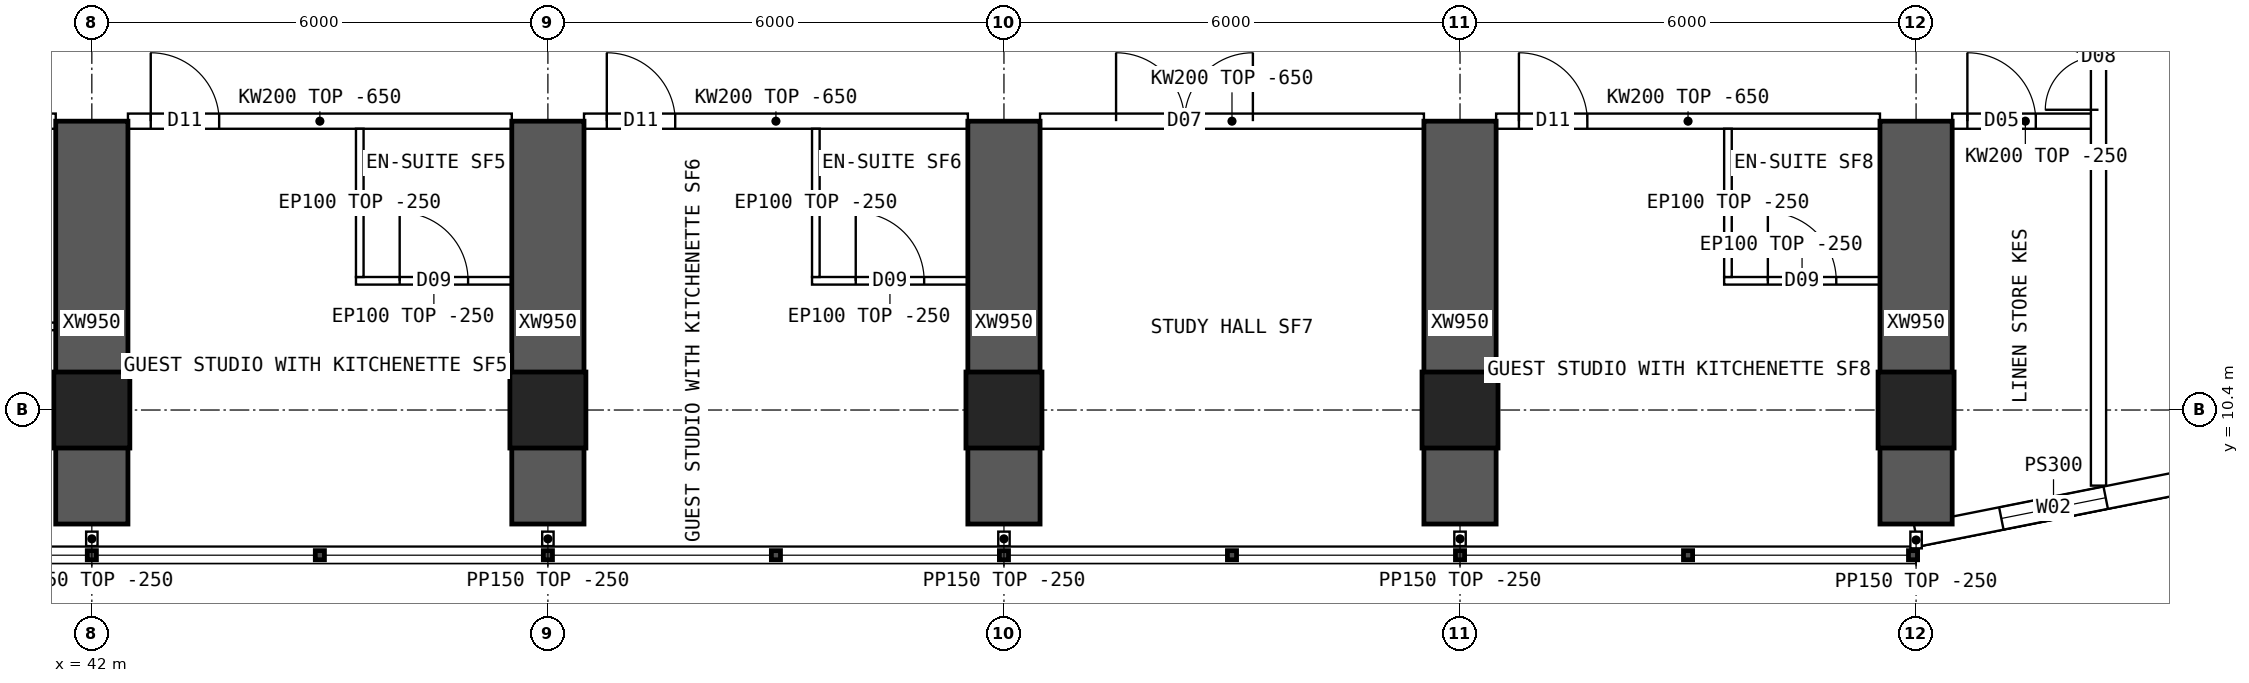
"""IFC4 building model, lengths in metres.
Left out: names, types, materials, properties, quantities, classifications, styles, units other than length and angle.
Written with IfcOpenShell. Run it as: python <this file> out.ifc"""

import sys

from ifc_helpers import new_model, si_unit, direction, frame, frame_2d, origin, origin_2d, place, context, subcontext, project, spatial, polyline, rectangle, hollow_rectangle, outline, extrude, element, fill, save


model = new_model("IFC4")
c1 = context("Model", 3, precision=1e-05, world=origin(), true_north=direction((0.0, 1.0)))
c2 = subcontext(c1, "Body", "Model", "MODEL_VIEW")
j1 = project(units=[si_unit("LENGTHUNIT", "METRE"), si_unit("PLANEANGLEUNIT", "RADIAN")], contexts=[c1])
p1 = place(None, origin())
s1 = spatial("IfcSite", under=j1, at=p1, CompositionType="ELEMENT")
p2 = place(p1, origin())
s2 = spatial("IfcBuilding", under=s1, at=p2, CompositionType="ELEMENT")
p3 = place(p2, frame((0.0, 0.0, 76.15)))
s3 = spatial("IfcBuildingStorey", under=s2, at=p3, CompositionType="ELEMENT", Elevation=76.15)
for number, where, z_axis, x_axis in (
    (1, (42.0, 10.4, 0.0), (0.0, 0.0, 1.0), (1.0, 0.0, 0.0)),
    (2, (48.0, 10.4, 0.0), (0.0, 0.0, 1.0), (1.0, 0.0, 0.0)),
    (3, (54.0, 10.4, 0.0), (0.0, 0.0, 1.0), (1.0, 0.0, 0.0)),
    (4, (60.0, 10.4, 0.0), (0.0, 0.0, 1.0), (1.0, 0.0, 0.0)),
    (5, (66.0, 10.4, 0.0), (0.0, 0.0, 1.0), (1.0, 0.0, 0.0)),
):
    element("IfcColumn", number, at=place(p3, frame(where, z_axis=z_axis, x_axis=x_axis)), inside=s3, PredefinedType="COLUMN", context=c2, shape_type="SweptSolid", body=[
        extrude(hollow_rectangle(XDim=1.0, YDim=1.0, WallThickness=0.1, at=origin_2d()), origin(), (0.0, 0.0, 1.0), 4.5),
    ])
for number, where, z_axis, x_axis in (
    (6, (42.0, 8.9, 0.0), (0.0, 0.0, 1.0), (0.0, 1.0, 0.0)),
    (7, (48.0, 8.9, 0.0), (0.0, 0.0, 1.0), (0.0, 1.0, 0.0)),
    (8, (54.0, 8.9, 0.0), (0.0, 0.0, 1.0), (0.0, 1.0, 0.0)),
    (9, (60.0, 8.9, 0.0), (0.0, 0.0, 1.0), (0.0, 1.0, 0.0)),
    (10, (66.0, 8.9, 0.0), (0.0, 0.0, 1.0), (0.0, 1.0, 0.0)),
):
    element("IfcWall", number, at=place(p3, frame(where, z_axis=z_axis, x_axis=x_axis)), inside=s3, PredefinedType="SHEAR", context=c2, shape_type="SweptSolid", body=[
        extrude(rectangle(XDim=5.3, YDim=0.95, at=frame_2d((2.65, 0.0))), origin(), (0.0, 0.0, 1.0), 4.5),
    ])
p4 = place(p3, frame((66.0, 8.75, 0.0), z_axis=(0.0, 0.0, 1.0), x_axis=(0.980791473772, 0.195059183267, 0.0)))
e11 = element("IfcWall", 11, at=p4, inside=s3, PredefinedType="SOLIDWALL", context=c2, shape_type="SweptSolid", body=[
    extrude(outline(polyline([(-0.03, -0.15), (3.717, -0.15), (3.657, 0.15), (0.03, 0.15), (-0.03, -0.15)])), origin(), (0.0, 0.0, 1.0), 4.25),
])
p5 = place(p4, frame((1.144, 0.0, 0.9)))
e12 = element("IfcOpeningElement", 12, at=p5, cuts=e11, PredefinedType="OPENING", context=c2, shape_type="SweptSolid", body=[
    extrude(rectangle(XDim=1.4, YDim=1.8, at=frame_2d((0.7, 0.9))), frame((0.0, 0.16, 0.0), z_axis=(0.0, -1.0, 0.0), x_axis=(1.0, 0.0, 0.0)), (0.0, 0.0, 1.0), 0.32),
])
p6 = place(p3, frame((36.475, 14.2, 0.0), z_axis=(0.0, 0.0, 1.0), x_axis=(1.0, 0.0, 0.0)))
e13 = element("IfcWall", 13, at=p6, inside=s3, PredefinedType="SOLIDWALL", context=c2, shape_type="SweptSolid", body=[
    extrude(outline(polyline([(0.0, 0.0), (5.05, 0.0), (5.05, 3.85), (0.0, 3.85), (0.0, 0.0)])), frame((0.0, 0.1, 0.0), z_axis=(0.0, -1.0, 0.0), x_axis=(1.0, 0.0, 0.0)), (0.0, 0.0, 1.0), 0.2),
])
p7 = place(p6, frame((0.3, 0.0, 0.0)))
e14 = element("IfcOpeningElement", 14, at=p7, cuts=e13, PredefinedType="OPENING", context=c2, shape_type="SweptSolid", body=[
    extrude(rectangle(XDim=1.0, YDim=2.1, at=frame_2d((0.5, 1.05))), frame((0.0, 0.11, 0.0), z_axis=(0.0, -1.0, 0.0), x_axis=(1.0, 0.0, 0.0)), (0.0, 0.0, 1.0), 0.22),
])
p8 = place(p3, frame((42.475, 14.2, 0.0), z_axis=(0.0, 0.0, 1.0), x_axis=(1.0, 0.0, 0.0)))
e15 = element("IfcWall", 15, at=p8, inside=s3, PredefinedType="SOLIDWALL", context=c2, shape_type="SweptSolid", body=[
    extrude(outline(polyline([(0.0, 0.0), (5.05, 0.0), (5.05, 3.85), (0.0, 3.85), (0.0, 0.0)])), frame((0.0, 0.1, 0.0), z_axis=(0.0, -1.0, 0.0), x_axis=(1.0, 0.0, 0.0)), (0.0, 0.0, 1.0), 0.2),
])
p9 = place(p8, frame((0.3, 0.0, 0.0)))
e16 = element("IfcOpeningElement", 16, at=p9, cuts=e15, PredefinedType="OPENING", context=c2, shape_type="SweptSolid", body=[
    extrude(rectangle(XDim=0.9, YDim=2.1, at=frame_2d((0.45, 1.05))), frame((0.0, 0.11, 0.0), z_axis=(0.0, -1.0, 0.0), x_axis=(1.0, 0.0, 0.0)), (0.0, 0.0, 1.0), 0.22),
])
p10 = place(p3, frame((48.475, 14.2, 0.0), z_axis=(0.0, 0.0, 1.0), x_axis=(1.0, 0.0, 0.0)))
e17 = element("IfcWall", 17, at=p10, inside=s3, PredefinedType="SOLIDWALL", context=c2, shape_type="SweptSolid", body=[
    extrude(outline(polyline([(0.0, 0.0), (5.05, 0.0), (5.05, 3.85), (0.0, 3.85), (0.0, 0.0)])), frame((0.0, 0.1, 0.0), z_axis=(0.0, -1.0, 0.0), x_axis=(1.0, 0.0, 0.0)), (0.0, 0.0, 1.0), 0.2),
])
p11 = place(p10, frame((0.3, 0.0, 0.0)))
e18 = element("IfcOpeningElement", 18, at=p11, cuts=e17, PredefinedType="OPENING", context=c2, shape_type="SweptSolid", body=[
    extrude(rectangle(XDim=0.9, YDim=2.1, at=frame_2d((0.45, 1.05))), frame((0.0, 0.11, 0.0), z_axis=(0.0, -1.0, 0.0), x_axis=(1.0, 0.0, 0.0)), (0.0, 0.0, 1.0), 0.22),
])
p12 = place(p3, frame((54.475, 14.2, 0.0), z_axis=(0.0, 0.0, 1.0), x_axis=(1.0, 0.0, 0.0)))
e19 = element("IfcWall", 19, at=p12, inside=s3, PredefinedType="SOLIDWALL", context=c2, shape_type="SweptSolid", body=[
    extrude(outline(polyline([(0.0, 0.0), (5.05, 0.0), (5.05, 3.85), (0.0, 3.85), (0.0, 0.0)])), frame((0.0, 0.1, 0.0), z_axis=(0.0, -1.0, 0.0), x_axis=(1.0, 0.0, 0.0)), (0.0, 0.0, 1.0), 0.2),
])
p13 = place(p12, frame((1.0, 0.0, 0.0)))
e20 = element("IfcOpeningElement", 20, at=p13, cuts=e19, PredefinedType="OPENING", context=c2, shape_type="SweptSolid", body=[
    extrude(rectangle(XDim=1.8, YDim=2.1, at=frame_2d((0.9, 1.05))), frame((0.0, 0.11, 0.0), z_axis=(0.0, -1.0, 0.0), x_axis=(1.0, 0.0, 0.0)), (0.0, 0.0, 1.0), 0.22),
])
p14 = place(p3, frame((60.475, 14.2, 0.0), z_axis=(0.0, 0.0, 1.0), x_axis=(1.0, 0.0, 0.0)))
e21 = element("IfcWall", 21, at=p14, inside=s3, PredefinedType="SOLIDWALL", context=c2, shape_type="SweptSolid", body=[
    extrude(outline(polyline([(0.0, 0.0), (5.05, 0.0), (5.05, 3.85), (0.0, 3.85), (0.0, 0.0)])), frame((0.0, 0.1, 0.0), z_axis=(0.0, -1.0, 0.0), x_axis=(1.0, 0.0, 0.0)), (0.0, 0.0, 1.0), 0.2),
])
p15 = place(p14, frame((0.3, 0.0, 0.0)))
e22 = element("IfcOpeningElement", 22, at=p15, cuts=e21, PredefinedType="OPENING", context=c2, shape_type="SweptSolid", body=[
    extrude(rectangle(XDim=0.9, YDim=2.1, at=frame_2d((0.45, 1.05))), frame((0.0, 0.11, 0.0), z_axis=(0.0, -1.0, 0.0), x_axis=(1.0, 0.0, 0.0)), (0.0, 0.0, 1.0), 0.22),
])
p16 = place(p3, frame((66.475, 14.2, 0.0), z_axis=(0.0, 0.0, 1.0), x_axis=(1.0, 0.0, 0.0)))
e23 = element("IfcWall", 23, at=p16, inside=s3, PredefinedType="SOLIDWALL", context=c2, shape_type="SweptSolid", body=[
    extrude(rectangle(XDim=1.925, YDim=0.2, at=frame_2d((0.962, 0.0))), origin(), (0.0, 0.0, 1.0), 4.25),
])
p17 = place(p16, frame((0.2, 0.0, 0.0)))
e24 = element("IfcOpeningElement", 24, at=p17, cuts=e23, PredefinedType="OPENING", context=c2, shape_type="SweptSolid", body=[
    extrude(rectangle(XDim=0.9, YDim=2.1, at=frame_2d((0.45, 1.05))), frame((0.0, 0.11, 0.0), z_axis=(0.0, -1.0, 0.0), x_axis=(1.0, 0.0, 0.0)), (0.0, 0.0, 1.0), 0.22),
])
p18 = place(p3, frame((38.875, 11.5, 0.0), z_axis=(0.0, 0.0, 1.0), x_axis=(1.0, 0.0, 0.0)))
e25 = element("IfcWall", 25, at=p18, inside=s3, PredefinedType="PARTITIONING", context=c2, shape_type="SweptSolid", body=[
    extrude(rectangle(XDim=2.65, YDim=0.1, at=frame_2d((1.325, 0.0))), origin(), (0.0, 0.0, 1.0), 4.25),
])
p19 = place(p3, frame((47.525, 12.1, 0.0), z_axis=(0.0, 0.0, 1.0), x_axis=(-1.0, 0.0, 0.0)))
e26 = element("IfcWall", 26, at=p19, inside=s3, PredefinedType="PARTITIONING", context=c2, shape_type="SweptSolid", body=[
    extrude(rectangle(XDim=2.05, YDim=0.1, at=frame_2d((1.025, 0.0))), origin(), (0.0, 0.0, 1.0), 4.25),
])
p20 = place(p19, frame((0.575, 0.0, 0.0)))
e27 = element("IfcOpeningElement", 27, at=p20, cuts=e26, PredefinedType="OPENING", context=c2, shape_type="SweptSolid", body=[
    extrude(rectangle(XDim=0.9, YDim=2.1, at=frame_2d((0.45, 1.05))), frame((0.0, 0.06, 0.0), z_axis=(0.0, -1.0, 0.0), x_axis=(1.0, 0.0, 0.0)), (0.0, 0.0, 1.0), 0.12),
])
p21 = place(p3, frame((45.525, 12.15, 0.0), z_axis=(0.0, 0.0, 1.0), x_axis=(0.0, 1.0, 0.0)))
e28 = element("IfcWall", 28, at=p21, inside=s3, PredefinedType="PARTITIONING", context=c2, shape_type="SweptSolid", body=[
    extrude(outline(polyline([(0.0, 0.0), (1.95, 0.0), (1.95, 3.85), (1.902, 3.85), (1.9, 4.25), (0.0, 4.25), (0.0, 0.0)])), frame((0.0, 0.05, 0.0), z_axis=(0.0, -1.0, 0.0), x_axis=(1.0, 0.0, 0.0)), (0.0, 0.0, 1.0), 0.1),
])
p22 = place(p3, frame((53.525, 12.1, 0.0), z_axis=(0.0, 0.0, 1.0), x_axis=(-1.0, 0.0, 0.0)))
e29 = element("IfcWall", 29, at=p22, inside=s3, PredefinedType="PARTITIONING", context=c2, shape_type="SweptSolid", body=[
    extrude(rectangle(XDim=2.05, YDim=0.1, at=frame_2d((1.025, 0.0))), origin(), (0.0, 0.0, 1.0), 4.25),
])
p23 = place(p22, frame((0.575, 0.0, 0.0)))
e30 = element("IfcOpeningElement", 30, at=p23, cuts=e29, PredefinedType="OPENING", context=c2, shape_type="SweptSolid", body=[
    extrude(rectangle(XDim=0.9, YDim=2.1, at=frame_2d((0.45, 1.05))), frame((0.0, 0.06, 0.0), z_axis=(0.0, -1.0, 0.0), x_axis=(1.0, 0.0, 0.0)), (0.0, 0.0, 1.0), 0.12),
])
p24 = place(p3, frame((51.525, 12.15, 0.0), z_axis=(0.0, 0.0, 1.0), x_axis=(0.0, 1.0, 0.0)))
e31 = element("IfcWall", 31, at=p24, inside=s3, PredefinedType="PARTITIONING", context=c2, shape_type="SweptSolid", body=[
    extrude(outline(polyline([(0.0, 0.0), (1.95, 0.0), (1.95, 3.85), (1.902, 3.85), (1.9, 4.25), (0.0, 4.25), (0.0, 0.0)])), frame((0.0, 0.05, 0.0), z_axis=(0.0, -1.0, 0.0), x_axis=(1.0, 0.0, 0.0)), (0.0, 0.0, 1.0), 0.1),
])
p25 = place(p3, frame((65.525, 12.1, 0.0), z_axis=(0.0, 0.0, 1.0), x_axis=(-1.0, 0.0, 0.0)))
e32 = element("IfcWall", 32, at=p25, inside=s3, PredefinedType="PARTITIONING", context=c2, shape_type="SweptSolid", body=[
    extrude(rectangle(XDim=2.05, YDim=0.1, at=frame_2d((1.025, 0.0))), origin(), (0.0, 0.0, 1.0), 4.25),
])
p26 = place(p25, frame((0.575, 0.0, 0.0)))
e33 = element("IfcOpeningElement", 33, at=p26, cuts=e32, PredefinedType="OPENING", context=c2, shape_type="SweptSolid", body=[
    extrude(rectangle(XDim=0.9, YDim=2.1, at=frame_2d((0.45, 1.05))), frame((0.0, 0.06, 0.0), z_axis=(0.0, -1.0, 0.0), x_axis=(1.0, 0.0, 0.0)), (0.0, 0.0, 1.0), 0.12),
])
p27 = place(p3, frame((63.525, 12.15, 0.0), z_axis=(0.0, 0.0, 1.0), x_axis=(0.0, 1.0, 0.0)))
e34 = element("IfcWall", 34, at=p27, inside=s3, PredefinedType="PARTITIONING", context=c2, shape_type="SweptSolid", body=[
    extrude(outline(polyline([(0.0, 0.0), (1.95, 0.0), (1.95, 3.85), (1.902, 3.85), (1.9, 4.25), (0.0, 4.25), (0.0, 0.0)])), frame((0.0, 0.05, 0.0), z_axis=(0.0, -1.0, 0.0), x_axis=(1.0, 0.0, 0.0)), (0.0, 0.0, 1.0), 0.1),
])
p28 = place(p3, frame((68.4, 9.405, 0.0), z_axis=(0.0, 0.0, 1.0), x_axis=(0.0, 1.0, 0.0)))
e35 = element("IfcWall", 35, at=p28, inside=s3, PredefinedType="SOLIDWALL", context=c2, shape_type="SweptSolid", body=[
    extrude(rectangle(XDim=45.189, YDim=0.2, at=frame_2d((22.595, 0.0))), origin(), (0.0, 0.0, 1.0), 4.25),
])
p29 = place(p28, frame((13.795, 0.0, 0.0)))
e36 = element("IfcOpeningElement", 36, at=p29, cuts=e35, PredefinedType="OPENING", context=c2, shape_type="SweptSolid", body=[
    extrude(rectangle(XDim=1.2, YDim=2.1, at=frame_2d((0.6, 1.05))), frame((0.0, 0.11, 0.0), z_axis=(0.0, -1.0, 0.0), x_axis=(1.0, 0.0, 0.0)), (0.0, 0.0, 1.0), 0.22),
])
p30 = place(p28, frame((25.595, 0.0, 0.0)))
e37 = element("IfcOpeningElement", 37, at=p30, cuts=e35, PredefinedType="OPENING", context=c2, shape_type="SweptSolid", body=[
    extrude(rectangle(XDim=1.2, YDim=2.1, at=frame_2d((0.6, 1.05))), frame((0.0, 0.11, 0.0), z_axis=(0.0, -1.0, 0.0), x_axis=(1.0, 0.0, 0.0)), (0.0, 0.0, 1.0), 0.22),
])
p31 = place(p28, frame((4.945, 0.0, 0.0)))
e38 = element("IfcOpeningElement", 38, at=p31, cuts=e35, PredefinedType="OPENING", context=c2, shape_type="SweptSolid", body=[
    extrude(rectangle(XDim=1.4, YDim=2.1, at=frame_2d((0.7, 1.05))), frame((0.0, 0.11, 0.0), z_axis=(0.0, -1.0, 0.0), x_axis=(1.0, 0.0, 0.0)), (0.0, 0.0, 1.0), 0.22),
])
p32 = place(p28, frame((38.745, 0.0, 0.0)))
e39 = element("IfcOpeningElement", 39, at=p32, cuts=e35, PredefinedType="OPENING", context=c2, shape_type="SweptSolid", body=[
    extrude(rectangle(XDim=1.4, YDim=2.1, at=frame_2d((0.7, 1.05))), frame((0.0, 0.11, 0.0), z_axis=(0.0, -1.0, 0.0), x_axis=(1.0, 0.0, 0.0)), (0.0, 0.0, 1.0), 0.22),
])
for number, where, z_axis, x_axis in (
    (40, (42.0, 8.8, 0.0), (0.0, 0.0, 1.0), (0.0, -1.0, 0.0)),
    (41, (48.0, 8.8, 0.0), (0.0, 0.0, 1.0), (0.0, -1.0, 0.0)),
    (42, (54.0, 8.8, 0.0), (0.0, 0.0, 1.0), (0.0, -1.0, 0.0)),
    (43, (60.0, 8.8, 0.0), (0.0, 0.0, 1.0), (0.0, -1.0, 0.0)),
):
    element("IfcWall", number, at=place(p3, frame(where, z_axis=z_axis, x_axis=x_axis)), inside=s3, PredefinedType="PARTITIONING", context=c2, shape_type="SweptSolid", body=[
        extrude(rectangle(XDim=0.19, YDim=0.15, at=frame_2d((0.095, 0.0))), origin(), (0.0, 0.0, 1.0), 4.25),
    ])
p33 = place(p3, frame((66.0, 8.8, 0.0), z_axis=(0.0, 0.0, 1.0), x_axis=(0.0, -1.0, 0.0)))
e44 = element("IfcWall", 44, at=p33, inside=s3, PredefinedType="PARTITIONING", context=c2, shape_type="SweptSolid", body=[
    extrude(rectangle(XDim=0.22, YDim=0.15, at=frame_2d((0.11, 0.0))), origin(), (0.0, 0.0, 1.0), 4.25),
])
p34 = place(p5, origin())
e45 = element("IfcWindow", 45, at=p34, inside=s3, PartitioningType="SINGLE_PANEL", PredefinedType="WINDOW", context=c2, shape_type="SweptSolid", body=[
    extrude(rectangle(XDim=1.4, YDim=1.8, at=frame_2d((0.7, 0.9))), frame((0.0, 0.03, 0.0), z_axis=(0.0, -1.0, 0.0), x_axis=(1.0, 0.0, 0.0)), (0.0, 0.0, 1.0), 0.06),
])
fill(e12, e45)
p35 = place(p20, origin())
e46 = element("IfcDoor", 46, at=p35, inside=s3, OperationType="SINGLE_SWING_RIGHT", PredefinedType="DOOR", context=c2, shape_type="SweptSolid", body=[
    extrude(rectangle(XDim=0.9, YDim=2.1, at=frame_2d((0.45, 1.05))), frame((0.0, 0.025, 0.0), z_axis=(0.0, -1.0, 0.0), x_axis=(1.0, 0.0, 0.0)), (0.0, 0.0, 1.0), 0.05),
])
fill(e27, e46)
p36 = place(p9, origin())
e47 = element("IfcDoor", 47, at=p36, inside=s3, OperationType="SINGLE_SWING_LEFT", PredefinedType="DOOR", context=c2, shape_type="SweptSolid", body=[
    extrude(rectangle(XDim=0.9, YDim=2.1, at=frame_2d((0.45, 1.05))), frame((0.0, 0.025, 0.0), z_axis=(0.0, -1.0, 0.0), x_axis=(1.0, 0.0, 0.0)), (0.0, 0.0, 1.0), 0.05),
])
fill(e16, e47)
p37 = place(p23, origin())
e48 = element("IfcDoor", 48, at=p37, inside=s3, OperationType="SINGLE_SWING_RIGHT", PredefinedType="DOOR", context=c2, shape_type="SweptSolid", body=[
    extrude(rectangle(XDim=0.9, YDim=2.1, at=frame_2d((0.45, 1.05))), frame((0.0, 0.025, 0.0), z_axis=(0.0, -1.0, 0.0), x_axis=(1.0, 0.0, 0.0)), (0.0, 0.0, 1.0), 0.05),
])
fill(e30, e48)
p38 = place(p11, origin())
e49 = element("IfcDoor", 49, at=p38, inside=s3, OperationType="SINGLE_SWING_LEFT", PredefinedType="DOOR", context=c2, shape_type="SweptSolid", body=[
    extrude(rectangle(XDim=0.9, YDim=2.1, at=frame_2d((0.45, 1.05))), frame((0.0, 0.025, 0.0), z_axis=(0.0, -1.0, 0.0), x_axis=(1.0, 0.0, 0.0)), (0.0, 0.0, 1.0), 0.05),
])
fill(e18, e49)
p39 = place(p13, origin())
e50 = element("IfcDoor", 50, at=p39, inside=s3, OperationType="DOUBLE_DOOR_SINGLE_SWING", PredefinedType="DOOR", context=c2, shape_type="SweptSolid", body=[
    extrude(rectangle(XDim=1.8, YDim=2.1, at=frame_2d((0.9, 1.05))), frame((0.0, 0.025, 0.0), z_axis=(0.0, -1.0, 0.0), x_axis=(1.0, 0.0, 0.0)), (0.0, 0.0, 1.0), 0.05),
])
fill(e20, e50)
p40 = place(p26, origin())
e51 = element("IfcDoor", 51, at=p40, inside=s3, OperationType="SINGLE_SWING_RIGHT", PredefinedType="DOOR", context=c2, shape_type="SweptSolid", body=[
    extrude(rectangle(XDim=0.9, YDim=2.1, at=frame_2d((0.45, 1.05))), frame((0.0, 0.025, 0.0), z_axis=(0.0, -1.0, 0.0), x_axis=(1.0, 0.0, 0.0)), (0.0, 0.0, 1.0), 0.05),
])
fill(e33, e51)
p41 = place(p15, origin())
e52 = element("IfcDoor", 52, at=p41, inside=s3, OperationType="SINGLE_SWING_LEFT", PredefinedType="DOOR", context=c2, shape_type="SweptSolid", body=[
    extrude(rectangle(XDim=0.9, YDim=2.1, at=frame_2d((0.45, 1.05))), frame((0.0, 0.025, 0.0), z_axis=(0.0, -1.0, 0.0), x_axis=(1.0, 0.0, 0.0)), (0.0, 0.0, 1.0), 0.05),
])
fill(e22, e52)
p42 = place(p31, origin())
e53 = element("IfcDoor", 53, at=p42, inside=s3, OperationType="DOUBLE_DOOR_SINGLE_SWING", PredefinedType="DOOR", context=c2, shape_type="SweptSolid", body=[
    extrude(rectangle(XDim=1.4, YDim=2.1, at=frame_2d((0.7, 1.05))), frame((0.0, 0.025, 0.0), z_axis=(0.0, -1.0, 0.0), x_axis=(1.0, 0.0, 0.0)), (0.0, 0.0, 1.0), 0.05),
])
fill(e38, e53)
p43 = place(p17, origin())
e54 = element("IfcDoor", 54, at=p43, inside=s3, OperationType="SINGLE_SWING_LEFT", PredefinedType="DOOR", context=c2, shape_type="SweptSolid", body=[
    extrude(rectangle(XDim=0.9, YDim=2.1, at=frame_2d((0.45, 1.05))), frame((0.0, 0.025, 0.0), z_axis=(0.0, -1.0, 0.0), x_axis=(1.0, 0.0, 0.0)), (0.0, 0.0, 1.0), 0.05),
])
fill(e24, e54)
save(model, sys.argv[1])
